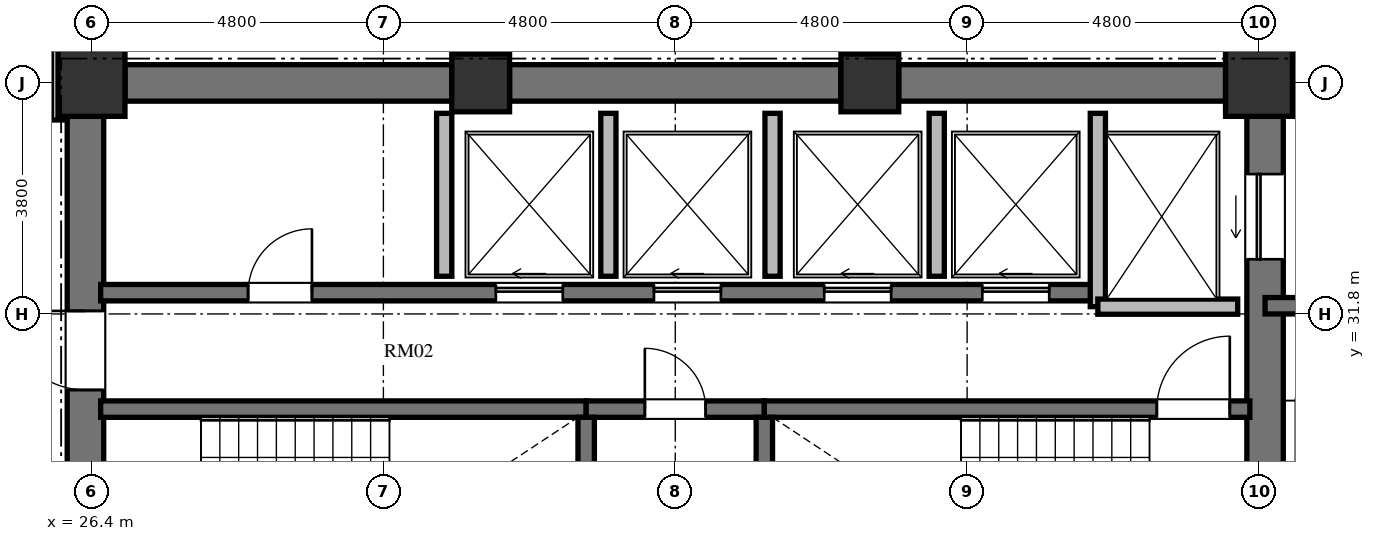
"""IFC4 building model, lengths in metres.
Left out: names, types, materials, properties, quantities, classifications, styles, units other than length and angle.
Written with IfcOpenShell. Run it as: python <this file> out.ifc"""

import sys

from ifc_helpers import new_model, si_unit, direction, frame, frame_2d, origin, origin_2d, place, context, subcontext, project, spatial, rectangle, extrude, element, fill, save


model = new_model("IFC4")
c1 = context("Model", 3, precision=1e-05, world=origin(), true_north=direction((0.0, 1.0)))
c2 = subcontext(c1, "Body", "Model", "MODEL_VIEW")
j1 = project(units=[si_unit("LENGTHUNIT", "METRE"), si_unit("PLANEANGLEUNIT", "RADIAN")], contexts=[c1])
p1 = place(None, origin())
s1 = spatial("IfcSite", under=j1, at=p1, CompositionType="ELEMENT")
p2 = place(p1, origin())
s2 = spatial("IfcBuilding", under=s1, at=p2, CompositionType="ELEMENT")
p3 = place(p2, frame((0.0, 0.0, 167.472)))
s3 = spatial("IfcBuildingStorey", under=s2, at=p3, CompositionType="ELEMENT", Elevation=167.472)
p4 = place(p3, frame((45.6, 35.6, 0.0), z_axis=(0.0, 0.0, 1.0), x_axis=(1.0, 0.0, 0.0)))
e1 = element("IfcColumn", 1, at=p4, inside=s3, PredefinedType="COLUMN", context=c2, shape_type="SweptSolid", body=[
    extrude(rectangle(XDim=1.1, YDim=1.1, at=origin_2d()), origin(), (0.0, 0.0, 1.0), 3.648),
])
for number, where, z_axis, x_axis in (
    (2, (39.2, 35.6, 0.0), (0.0, 0.0, 1.0), (1.0, 0.0, 0.0)),
    (3, (32.8, 35.6, 0.0), (0.0, 0.0, 1.0), (1.0, 0.0, 0.0)),
):
    element("IfcColumn", number, at=place(p3, frame(where, z_axis=z_axis, x_axis=x_axis)), inside=s3, PredefinedType="COLUMN", context=c2, shape_type="SweptSolid", body=[
        extrude(rectangle(XDim=0.95, YDim=0.95, at=origin_2d()), origin(), (0.0, 0.0, 1.0), 3.648),
    ])
p5 = place(p3, frame((26.4, 35.6, 0.0), z_axis=(0.0, 0.0, 1.0), x_axis=(1.0, 0.0, 0.0)))
e4 = element("IfcColumn", 4, at=p5, inside=s3, PredefinedType="COLUMN", context=c2, shape_type="SweptSolid", body=[
    extrude(rectangle(XDim=1.1, YDim=1.1, at=origin_2d()), origin(), (0.0, 0.0, 1.0), 3.648),
])
p6 = place(p3, frame((26.3, 20.95, 0.0), z_axis=(0.0, 0.0, 1.0), x_axis=(0.0, 1.0, 0.0)))
e5 = element("IfcWall", 5, at=p6, inside=s3, PredefinedType="SHEAR", context=c2, shape_type="SweptSolid", body=[
    extrude(rectangle(XDim=14.1, YDim=0.6, at=frame_2d((7.05, 0.0))), origin(), (0.0, 0.0, 1.0), 3.648),
])
p7 = place(p6, frame((6.5, 0.0, 0.0)))
e6 = element("IfcOpeningElement", 6, at=p7, cuts=e5, PredefinedType="OPENING", context=c2, shape_type="SweptSolid", body=[
    extrude(rectangle(XDim=1.2, YDim=2.15, at=frame_2d((0.6, 1.075))), frame((0.0, 0.31, 0.0), z_axis=(0.0, -1.0, 0.0), x_axis=(1.0, 0.0, 0.0)), (0.0, 0.0, 1.0), 0.62),
])
p8 = place(p6, frame((9.6, 0.0, 0.0)))
e7 = element("IfcOpeningElement", 7, at=p8, cuts=e5, PredefinedType="OPENING", context=c2, shape_type="SweptSolid", body=[
    extrude(rectangle(XDim=1.3, YDim=2.2, at=frame_2d((0.65, 1.1))), frame((0.0, 0.31, 0.0), z_axis=(0.0, -1.0, 0.0), x_axis=(1.0, 0.0, 0.0)), (0.0, 0.0, 1.0), 0.62),
])
p9 = place(p6, frame((3.26, 0.0, 0.0)))
e8 = element("IfcOpeningElement", 8, at=p9, cuts=e5, PredefinedType="OPENING", context=c2, shape_type="SweptSolid", body=[
    extrude(rectangle(XDim=1.3, YDim=2.2, at=frame_2d((0.65, 1.1))), frame((0.0, 0.31, 0.0), z_axis=(0.0, -1.0, 0.0), x_axis=(1.0, 0.0, 0.0)), (0.0, 0.0, 1.0), 0.62),
])
p10 = place(p3, frame((45.7, 20.95, 0.0), z_axis=(0.0, 0.0, 1.0), x_axis=(0.0, 1.0, 0.0)))
e9 = element("IfcWall", 9, at=p10, inside=s3, PredefinedType="SHEAR", context=c2, shape_type="SweptSolid", body=[
    extrude(rectangle(XDim=14.1, YDim=0.6, at=frame_2d((7.05, 0.0))), origin(), (0.0, 0.0, 1.0), 3.648),
])
p11 = place(p10, frame((11.75, 0.0, 0.0)))
e10 = element("IfcOpeningElement", 10, at=p11, cuts=e9, PredefinedType="OPENING", context=c2, shape_type="SweptSolid", body=[
    extrude(rectangle(XDim=1.4, YDim=2.3, at=frame_2d((0.7, 1.15))), frame((0.0, 0.31, 0.0), z_axis=(0.0, -1.0, 0.0), x_axis=(1.0, 0.0, 0.0)), (0.0, 0.0, 1.0), 0.62),
])
p12 = place(p10, frame((0.95, 0.0, 0.0)))
e11 = element("IfcOpeningElement", 11, at=p12, cuts=e9, PredefinedType="OPENING", context=c2, shape_type="SweptSolid", body=[
    extrude(rectangle(XDim=1.4, YDim=2.3, at=frame_2d((0.7, 1.15))), frame((0.0, 0.31, 0.0), z_axis=(0.0, -1.0, 0.0), x_axis=(1.0, 0.0, 0.0)), (0.0, 0.0, 1.0), 0.62),
])
p13 = place(p3, frame((26.95, 35.6, 0.0), z_axis=(0.0, 0.0, 1.0), x_axis=(1.0, 0.0, 0.0)))
e12 = element("IfcWall", 12, at=p13, inside=s3, PredefinedType="SHEAR", context=c2, shape_type="SweptSolid", body=[
    extrude(rectangle(XDim=5.375, YDim=0.6, at=frame_2d((2.688, 0.0))), origin(), (0.0, 0.0, 1.0), 3.648),
])
p14 = place(p3, frame((33.275, 35.6, 0.0), z_axis=(0.0, 0.0, 1.0), x_axis=(1.0, 0.0, 0.0)))
e13 = element("IfcWall", 13, at=p14, inside=s3, PredefinedType="SHEAR", context=c2, shape_type="SweptSolid", body=[
    extrude(rectangle(XDim=5.45, YDim=0.6, at=frame_2d((2.725, 0.0))), origin(), (0.0, 0.0, 1.0), 3.648),
])
p15 = place(p3, frame((39.675, 35.6, 0.0), z_axis=(0.0, 0.0, 1.0), x_axis=(1.0, 0.0, 0.0)))
e14 = element("IfcWall", 14, at=p15, inside=s3, PredefinedType="SHEAR", context=c2, shape_type="SweptSolid", body=[
    extrude(rectangle(XDim=5.375, YDim=0.6, at=frame_2d((2.688, 0.0))), origin(), (0.0, 0.0, 1.0), 3.648),
])
p16 = place(p3, frame((26.55, 30.235, 0.0), z_axis=(0.0, 0.0, 1.0), x_axis=(1.0, 0.0, 0.0)))
e15 = element("IfcWall", 15, at=p16, inside=s3, PredefinedType="SHEAR", context=c2, shape_type="SweptSolid", body=[
    extrude(rectangle(XDim=7.985, YDim=0.27, at=frame_2d((3.992, 0.0))), origin(), (0.0, 0.0, 1.0), 3.648),
])
p17 = place(p3, frame((34.535, 30.235, 0.0), z_axis=(0.0, 0.0, 1.0), x_axis=(1.0, 0.0, 0.0)))
e16 = element("IfcWall", 16, at=p17, inside=s3, PredefinedType="SHEAR", context=c2, shape_type="SweptSolid", body=[
    extrude(rectangle(XDim=2.93, YDim=0.27, at=frame_2d((1.465, 0.0))), origin(), (0.0, 0.0, 1.0), 3.648),
])
p18 = place(p17, frame((0.965, 0.0, 0.0)))
e17 = element("IfcOpeningElement", 17, at=p18, cuts=e16, PredefinedType="OPENING", context=c2, shape_type="SweptSolid", body=[
    extrude(rectangle(XDim=1.0, YDim=2.1, at=frame_2d((0.5, 1.05))), frame((0.0, 0.145, 0.0), z_axis=(0.0, -1.0, 0.0), x_axis=(1.0, 0.0, 0.0)), (0.0, 0.0, 1.0), 0.29),
])
p19 = place(p3, frame((37.465, 30.235, 0.0), z_axis=(0.0, 0.0, 1.0), x_axis=(1.0, 0.0, 0.0)))
e18 = element("IfcWall", 18, at=p19, inside=s3, PredefinedType="SHEAR", context=c2, shape_type="SweptSolid", body=[
    extrude(rectangle(XDim=7.985, YDim=0.27, at=frame_2d((3.992, 0.0))), origin(), (0.0, 0.0, 1.0), 3.648),
])
p20 = place(p19, frame((6.455, 0.0, 0.0)))
e19 = element("IfcOpeningElement", 19, at=p20, cuts=e18, PredefinedType="OPENING", context=c2, shape_type="SweptSolid", body=[
    extrude(rectangle(XDim=1.2, YDim=2.15, at=frame_2d((0.6, 1.075))), frame((0.0, 0.145, 0.0), z_axis=(0.0, -1.0, 0.0), x_axis=(1.0, 0.0, 0.0)), (0.0, 0.0, 1.0), 0.29),
])
for number, where, z_axis, x_axis in (
    (20, (34.535, 26.02, 0.0), (0.0, 0.0, 1.0), (0.0, 1.0, 0.0)),
    (21, (37.465, 26.02, 0.0), (0.0, 0.0, 1.0), (0.0, 1.0, 0.0)),
):
    element("IfcWall", number, at=place(p3, frame(where, z_axis=z_axis, x_axis=x_axis)), inside=s3, PredefinedType="SHEAR", context=c2, shape_type="SweptSolid", body=[
        extrude(rectangle(XDim=4.08, YDim=0.27, at=frame_2d((2.04, 0.0))), origin(), (0.0, 0.0, 1.0), 3.648),
    ])
p21 = place(p3, frame((26.55, 32.15, 0.0), z_axis=(0.0, 0.0, 1.0), x_axis=(1.0, 0.0, 0.0)))
e22 = element("IfcWall", 22, at=p21, inside=s3, PredefinedType="SHEAR", context=c2, shape_type="SweptSolid", body=[
    extrude(rectangle(XDim=16.4, YDim=0.27, at=frame_2d((8.2, 0.0))), origin(), (0.0, 0.0, 1.0), 3.648),
])
p22 = place(p21, frame((2.425, 0.0, 0.0)))
e23 = element("IfcOpeningElement", 23, at=p22, cuts=e22, PredefinedType="OPENING", context=c2, shape_type="SweptSolid", body=[
    extrude(rectangle(XDim=1.05, YDim=2.15, at=frame_2d((0.525, 1.075))), frame((0.0, 0.145, 0.0), z_axis=(0.0, -1.0, 0.0), x_axis=(1.0, 0.0, 0.0)), (0.0, 0.0, 1.0), 0.29),
])
p23 = place(p21, frame((6.5, 0.0, 0.0)))
e24 = element("IfcOpeningElement", 24, at=p23, cuts=e22, PredefinedType="OPENING", context=c2, shape_type="SweptSolid", body=[
    extrude(rectangle(XDim=1.1, YDim=2.2, at=frame_2d((0.55, 1.1))), frame((0.0, 0.145, 0.0), z_axis=(0.0, -1.0, 0.0), x_axis=(1.0, 0.0, 0.0)), (0.0, 0.0, 1.0), 0.29),
])
p24 = place(p21, frame((9.1, 0.0, 0.0)))
e25 = element("IfcOpeningElement", 25, at=p24, cuts=e22, PredefinedType="OPENING", context=c2, shape_type="SweptSolid", body=[
    extrude(rectangle(XDim=1.1, YDim=2.2, at=frame_2d((0.55, 1.1))), frame((0.0, 0.145, 0.0), z_axis=(0.0, -1.0, 0.0), x_axis=(1.0, 0.0, 0.0)), (0.0, 0.0, 1.0), 0.29),
])
p25 = place(p21, frame((11.9, 0.0, 0.0)))
e26 = element("IfcOpeningElement", 26, at=p25, cuts=e22, PredefinedType="OPENING", context=c2, shape_type="SweptSolid", body=[
    extrude(rectangle(XDim=1.1, YDim=2.2, at=frame_2d((0.55, 1.1))), frame((0.0, 0.145, 0.0), z_axis=(0.0, -1.0, 0.0), x_axis=(1.0, 0.0, 0.0)), (0.0, 0.0, 1.0), 0.29),
])
p26 = place(p21, frame((14.5, 0.0, 0.0)))
e27 = element("IfcOpeningElement", 27, at=p26, cuts=e22, PredefinedType="OPENING", context=c2, shape_type="SweptSolid", body=[
    extrude(rectangle(XDim=1.1, YDim=2.2, at=frame_2d((0.55, 1.1))), frame((0.0, 0.145, 0.0), z_axis=(0.0, -1.0, 0.0), x_axis=(1.0, 0.0, 0.0)), (0.0, 0.0, 1.0), 0.29),
])
p27 = place(p3, frame((42.95, 31.92, 0.0), z_axis=(0.0, 0.0, 1.0), x_axis=(0.0, 1.0, 0.0)))
e28 = element("IfcWall", 28, at=p27, inside=s3, PredefinedType="SOLIDWALL", context=c2, shape_type="SweptSolid", body=[
    extrude(rectangle(XDim=3.18, YDim=0.25, at=frame_2d((1.59, 0.0))), origin(), (0.0, 0.0, 1.0), 3.428),
])
p28 = place(p3, frame((42.95, 31.92, 0.0), z_axis=(0.0, 0.0, 1.0), x_axis=(1.0, 0.0, 0.0)))
e29 = element("IfcWall", 29, at=p28, inside=s3, PredefinedType="SOLIDWALL", context=c2, shape_type="SweptSolid", body=[
    extrude(rectangle(XDim=2.3, YDim=0.25, at=frame_2d((1.15, 0.0))), origin(), (0.0, 0.0, 1.0), 3.428),
])
for number, where, z_axis, x_axis in (
    (30, (32.2, 32.42, 0.0), (0.0, 0.0, 1.0), (0.0, 1.0, 0.0)),
    (31, (34.9, 32.42, 0.0), (0.0, 0.0, 1.0), (0.0, 1.0, 0.0)),
    (32, (37.6, 32.42, 0.0), (0.0, 0.0, 1.0), (0.0, 1.0, 0.0)),
    (33, (40.3, 32.42, 0.0), (0.0, 0.0, 1.0), (0.0, 1.0, 0.0)),
):
    element("IfcWall", number, at=place(p3, frame(where, z_axis=z_axis, x_axis=x_axis)), inside=s3, PredefinedType="SOLIDWALL", context=c2, shape_type="SweptSolid", body=[
        extrude(rectangle(XDim=2.68, YDim=0.25, at=frame_2d((1.34, 0.0))), origin(), (0.0, 0.0, 1.0), 3.428),
    ])
p29 = place(p3, frame((46.0, 35.98, 0.0), z_axis=(0.0, 0.0, 1.0), x_axis=(1.0, 0.0, 0.0)))
e34 = element("IfcWall", 34, at=p29, inside=s3, PredefinedType="SHEAR", context=c2, shape_type="SweptSolid", body=[
    extrude(rectangle(XDim=4.55, YDim=0.27, at=frame_2d((2.275, 0.0))), origin(), (0.0, 0.0, 1.0), 3.648),
])
p30 = place(p3, frame((45.7, 31.935, 0.0), z_axis=(0.0, 0.0, 1.0), x_axis=(1.0, 0.0, 0.0)))
e35 = element("IfcWall", 35, at=p30, inside=s3, PredefinedType="SHEAR", context=c2, shape_type="SweptSolid", body=[
    extrude(rectangle(XDim=4.715, YDim=0.27, at=frame_2d((2.357, 0.0))), origin(), (0.0, 0.0, 1.0), 3.648),
])
p31 = place(p3, frame((25.83, 36.21, 0.0), z_axis=(0.0, 0.0, 1.0), x_axis=(0.0, -1.0, 0.0)))
e36 = element("IfcWall", 36, at=p31, inside=s3, PredefinedType="PARTITIONING", context=c2, shape_type="SweptSolid", body=[
    extrude(rectangle(XDim=1.22, YDim=0.18, at=frame_2d((0.61, 0.0))), origin(), (0.0, 0.0, 1.0), 3.428),
])
p32 = place(p20, origin())
e37 = element("IfcDoor", 37, at=p32, inside=s3, OperationType="SINGLE_SWING_RIGHT", PredefinedType="DOOR", context=c2, shape_type="SweptSolid", body=[
    extrude(rectangle(XDim=1.2, YDim=2.15, at=frame_2d((0.6, 1.075))), frame((0.0, 0.025, 0.0), z_axis=(0.0, -1.0, 0.0), x_axis=(1.0, 0.0, 0.0)), (0.0, 0.0, 1.0), 0.05),
])
fill(e19, e37)
p33 = place(p18, origin())
e38 = element("IfcDoor", 38, at=p33, inside=s3, OperationType="SINGLE_SWING_LEFT", PredefinedType="DOOR", context=c2, shape_type="SweptSolid", body=[
    extrude(rectangle(XDim=1.0, YDim=2.1, at=frame_2d((0.5, 1.05))), frame((0.0, 0.025, 0.0), z_axis=(0.0, -1.0, 0.0), x_axis=(1.0, 0.0, 0.0)), (0.0, 0.0, 1.0), 0.05),
])
fill(e17, e38)
p34 = place(p8, origin())
e39 = element("IfcDoor", 39, at=p34, inside=s3, OperationType="SINGLE_SWING_RIGHT", PredefinedType="DOOR", context=c2, shape_type="SweptSolid", body=[
    extrude(rectangle(XDim=1.3, YDim=2.2, at=frame_2d((0.65, 1.1))), frame((0.0, 0.025, 0.0), z_axis=(0.0, -1.0, 0.0), x_axis=(1.0, 0.0, 0.0)), (0.0, 0.0, 1.0), 0.05),
])
fill(e7, e39)
p35 = place(p22, origin())
e40 = element("IfcDoor", 40, at=p35, inside=s3, OperationType="SINGLE_SWING_RIGHT", PredefinedType="DOOR", context=c2, shape_type="SweptSolid", body=[
    extrude(rectangle(XDim=1.05, YDim=2.15, at=frame_2d((0.525, 1.075))), frame((0.0, 0.025, 0.0), z_axis=(0.0, -1.0, 0.0), x_axis=(1.0, 0.0, 0.0)), (0.0, 0.0, 1.0), 0.05),
])
fill(e23, e40)
p36 = place(p23, origin())
e41 = element("IfcDoor", 41, at=p36, inside=s3, OperationType="SLIDING_TO_LEFT", PredefinedType="DOOR", context=c2, shape_type="SweptSolid", body=[
    extrude(rectangle(XDim=1.1, YDim=2.2, at=frame_2d((0.55, 1.1))), frame((0.0, 0.025, 0.0), z_axis=(0.0, -1.0, 0.0), x_axis=(1.0, 0.0, 0.0)), (0.0, 0.0, 1.0), 0.05),
])
fill(e24, e41)
p37 = place(p24, origin())
e42 = element("IfcDoor", 42, at=p37, inside=s3, OperationType="SLIDING_TO_LEFT", PredefinedType="DOOR", context=c2, shape_type="SweptSolid", body=[
    extrude(rectangle(XDim=1.1, YDim=2.2, at=frame_2d((0.55, 1.1))), frame((0.0, 0.025, 0.0), z_axis=(0.0, -1.0, 0.0), x_axis=(1.0, 0.0, 0.0)), (0.0, 0.0, 1.0), 0.05),
])
fill(e25, e42)
p38 = place(p25, origin())
e43 = element("IfcDoor", 43, at=p38, inside=s3, OperationType="SLIDING_TO_LEFT", PredefinedType="DOOR", context=c2, shape_type="SweptSolid", body=[
    extrude(rectangle(XDim=1.1, YDim=2.2, at=frame_2d((0.55, 1.1))), frame((0.0, 0.025, 0.0), z_axis=(0.0, -1.0, 0.0), x_axis=(1.0, 0.0, 0.0)), (0.0, 0.0, 1.0), 0.05),
])
fill(e26, e43)
p39 = place(p26, origin())
e44 = element("IfcDoor", 44, at=p39, inside=s3, OperationType="SLIDING_TO_LEFT", PredefinedType="DOOR", context=c2, shape_type="SweptSolid", body=[
    extrude(rectangle(XDim=1.1, YDim=2.2, at=frame_2d((0.55, 1.1))), frame((0.0, 0.025, 0.0), z_axis=(0.0, -1.0, 0.0), x_axis=(1.0, 0.0, 0.0)), (0.0, 0.0, 1.0), 0.05),
])
fill(e27, e44)
p40 = place(p11, origin())
e45 = element("IfcDoor", 45, at=p40, inside=s3, OperationType="SLIDING_TO_LEFT", PredefinedType="DOOR", context=c2, shape_type="SweptSolid", body=[
    extrude(rectangle(XDim=1.4, YDim=2.3, at=frame_2d((0.7, 1.15))), frame((0.0, 0.025, 0.0), z_axis=(0.0, -1.0, 0.0), x_axis=(1.0, 0.0, 0.0)), (0.0, 0.0, 1.0), 0.05),
])
fill(e10, e45)
save(model, sys.argv[1])
